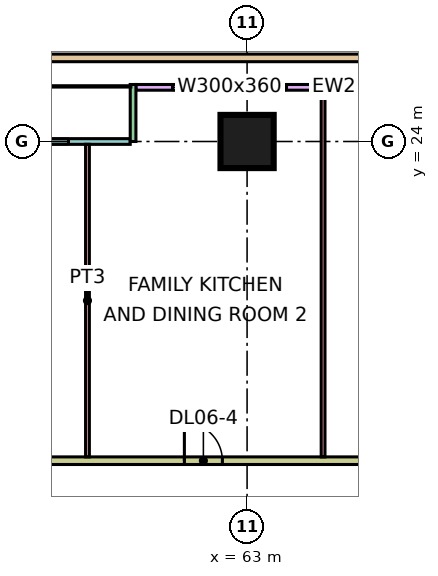
"""IFC4 building model, lengths in metres.
Left out: names, types, materials, properties, quantities, classifications, styles, units other than length and angle.
Written with IfcOpenShell. Run it as: python <this file> out.ifc"""

import sys

from ifc_helpers import new_model, si_unit, direction, frame, frame_2d, origin, origin_2d, place, context, subcontext, project, spatial, rectangle, extrude, element, fill, save


model = new_model("IFC4")
c1 = context("Model", 3, precision=1e-05, world=origin(), true_north=direction((0.0, 1.0)))
c2 = subcontext(c1, "Body", "Model", "MODEL_VIEW")
j1 = project(units=[si_unit("LENGTHUNIT", "METRE"), si_unit("PLANEANGLEUNIT", "RADIAN")], contexts=[c1])
p1 = place(None, origin())
s1 = spatial("IfcSite", under=j1, at=p1, CompositionType="ELEMENT")
p2 = place(p1, origin())
s2 = spatial("IfcBuilding", under=s1, at=p2, CompositionType="ELEMENT")
p3 = place(p2, frame((0.0, 0.0, 35.4)))
s3 = spatial("IfcBuildingStorey", under=s2, at=p3, CompositionType="ELEMENT", Elevation=35.4)
p4 = place(p3, frame((63.0, 24.0, 0.0), z_axis=(0.0, 0.0, 1.0), x_axis=(1.0, 0.0, 0.0)))
e1 = element("IfcColumn", 1, at=p4, inside=s3, PredefinedType="COLUMN", context=c2, shape_type="SweptSolid", body=[
    extrude(rectangle(XDim=1.4, YDim=1.4, at=origin_2d()), origin(), (0.0, 0.0, 1.0), 6.0),
])
p5 = place(p3, frame((70.5, 25.425, 0.0), z_axis=(0.0, 0.0, 1.0), x_axis=(-1.0, 0.0, 0.0)))
e2 = element("IfcWall", 2, at=p5, inside=s3, PredefinedType="SOLIDWALL", context=c2, shape_type="SweptSolid", body=[
    extrude(rectangle(XDim=10.425, YDim=0.15, at=frame_2d((5.212, 0.0))), origin(), (0.0, 0.0, 1.0), 5.6),
])
p6 = place(p5, frame((1.25, 0.0, 0.45)))
e3 = element("IfcOpeningElement", 3, at=p6, cuts=e2, PredefinedType="OPENING", context=c2, shape_type="SweptSolid", body=[
    extrude(rectangle(XDim=3.0, YDim=3.6, at=frame_2d((1.5, 1.8))), frame((0.0, 0.085, 0.0), z_axis=(0.0, -1.0, 0.0), x_axis=(1.0, 0.0, 0.0)), (0.0, 0.0, 1.0), 0.17),
])
p7 = place(p5, frame((6.462, 0.0, 0.45)))
e4 = element("IfcOpeningElement", 4, at=p7, cuts=e2, PredefinedType="OPENING", context=c2, shape_type="SweptSolid", body=[
    extrude(rectangle(XDim=3.0, YDim=3.6, at=frame_2d((1.5, 1.8))), frame((0.0, 0.085, 0.0), z_axis=(0.0, -1.0, 0.0), x_axis=(1.0, 0.0, 0.0)), (0.0, 0.0, 1.0), 0.17),
])
p8 = place(p3, frame((59.925, 24.0, 0.0), z_axis=(0.0, 0.0, 1.0), x_axis=(-1.0, 0.0, 0.0)))
e5 = element("IfcWall", 5, at=p8, inside=s3, PredefinedType="SOLIDWALL", context=c2, shape_type="SweptSolid", body=[
    extrude(rectangle(XDim=11.85, YDim=0.15, at=frame_2d((5.925, 0.0))), origin(), (0.0, 0.0, 1.0), 5.6),
])
p9 = place(p8, frame((1.625, 0.0, 0.45)))
e6 = element("IfcOpeningElement", 6, at=p9, cuts=e5, PredefinedType="OPENING", context=c2, shape_type="SweptSolid", body=[
    extrude(rectangle(XDim=3.0, YDim=3.6, at=frame_2d((1.5, 1.8))), frame((0.0, 0.085, 0.0), z_axis=(0.0, -1.0, 0.0), x_axis=(1.0, 0.0, 0.0)), (0.0, 0.0, 1.0), 0.17),
])
p10 = place(p8, frame((8.087, 0.0, 0.45)))
e7 = element("IfcOpeningElement", 7, at=p10, cuts=e5, PredefinedType="OPENING", context=c2, shape_type="SweptSolid", body=[
    extrude(rectangle(XDim=3.0, YDim=3.6, at=frame_2d((1.5, 1.8))), frame((0.0, 0.085, 0.0), z_axis=(0.0, -1.0, 0.0), x_axis=(1.0, 0.0, 0.0)), (0.0, 0.0, 1.0), 0.17),
])
p11 = place(p3, frame((60.0, 25.5, 0.0), z_axis=(0.0, 0.0, 1.0), x_axis=(0.0, -1.0, 0.0)))
e8 = element("IfcWall", 8, at=p11, inside=s3, PredefinedType="SOLIDWALL", context=c2, shape_type="SweptSolid", body=[
    extrude(rectangle(XDim=1.5, YDim=0.15, at=frame_2d((0.75, 0.0))), origin(), (0.0, 0.0, 1.0), 5.6),
])
p12 = place(p3, frame((40.79, 26.2, 0.0), z_axis=(0.0, 0.0, 1.0), x_axis=(1.0, 0.0, 0.0)))
e9 = element("IfcWall", 9, at=p12, inside=s3, PredefinedType="PARAPET", context=c2, shape_type="SweptSolid", body=[
    extrude(rectangle(XDim=30.0, YDim=0.2, at=frame_2d((15.0, 0.0))), origin(), (0.0, 0.0, 1.0), 0.5),
])
p13 = place(p3, frame((51.225, 15.6, 0.0), z_axis=(0.0, 0.0, 1.0), x_axis=(1.0, 0.0, 0.0)))
e10 = element("IfcWall", 10, at=p13, inside=s3, PredefinedType="PARTITIONING", context=c2, shape_type="SweptSolid", body=[
    extrude(rectangle(XDim=21.575, YDim=0.2, at=frame_2d((10.788, 0.0))), origin(), (0.0, 0.0, 1.0), 5.6),
])
p14 = place(p13, frame((0.225, 0.0, 0.0)))
e11 = element("IfcOpeningElement", 11, at=p14, cuts=e10, PredefinedType="OPENING", context=c2, shape_type="SweptSolid", body=[
    extrude(rectangle(XDim=1.0, YDim=2.1, at=frame_2d((0.5, 1.05))), frame((0.0, 0.11, 0.0), z_axis=(0.0, -1.0, 0.0), x_axis=(1.0, 0.0, 0.0)), (0.0, 0.0, 1.0), 0.22),
])
p15 = place(p13, frame((3.925, 0.0, 0.0)))
e12 = element("IfcOpeningElement", 12, at=p15, cuts=e10, PredefinedType="OPENING", context=c2, shape_type="SweptSolid", body=[
    extrude(rectangle(XDim=1.0, YDim=2.1, at=frame_2d((0.5, 1.05))), frame((0.0, 0.11, 0.0), z_axis=(0.0, -1.0, 0.0), x_axis=(1.0, 0.0, 0.0)), (0.0, 0.0, 1.0), 0.22),
])
p16 = place(p13, frame((10.125, 0.0, 0.0)))
e13 = element("IfcOpeningElement", 13, at=p16, cuts=e10, PredefinedType="OPENING", context=c2, shape_type="SweptSolid", body=[
    extrude(rectangle(XDim=1.0, YDim=2.1, at=frame_2d((0.5, 1.05))), frame((0.0, 0.11, 0.0), z_axis=(0.0, -1.0, 0.0), x_axis=(1.0, 0.0, 0.0)), (0.0, 0.0, 1.0), 0.22),
])
p17 = place(p13, frame((16.325, 0.0, 0.0)))
e14 = element("IfcOpeningElement", 14, at=p17, cuts=e10, PredefinedType="OPENING", context=c2, shape_type="SweptSolid", body=[
    extrude(rectangle(XDim=1.0, YDim=2.1, at=frame_2d((0.5, 1.05))), frame((0.0, 0.11, 0.0), z_axis=(0.0, -1.0, 0.0), x_axis=(1.0, 0.0, 0.0)), (0.0, 0.0, 1.0), 0.22),
])
p18 = place(p3, frame((58.8, 15.7, 0.0), z_axis=(0.0, 0.0, 1.0), x_axis=(0.0, 1.0, 0.0)))
e15 = element("IfcWall", 15, at=p18, inside=s3, PredefinedType="PARTITIONING", context=c2, shape_type="SweptSolid", body=[
    extrude(rectangle(XDim=8.226, YDim=0.1, at=frame_2d((4.113, 0.0))), origin(), (0.0, 0.0, 1.0), 5.6),
])
p19 = place(p3, frame((65.0, 15.7, 0.0), z_axis=(0.0, 0.0, 1.0), x_axis=(0.0, 1.0, 0.0)))
e16 = element("IfcWall", 16, at=p19, inside=s3, PredefinedType="PARTITIONING", context=c2, shape_type="SweptSolid", body=[
    extrude(rectangle(XDim=9.651, YDim=0.1, at=frame_2d((4.826, 0.0))), origin(), (0.0, 0.0, 1.0), 5.6),
])
p20 = place(p7, origin())
e17 = element("IfcWindow", 17, at=p20, inside=s3, PartitioningType="SINGLE_PANEL", PredefinedType="WINDOW", context=c2, shape_type="SweptSolid", body=[
    extrude(rectangle(XDim=3.0, YDim=3.6, at=frame_2d((1.5, 1.8))), frame((0.0, 0.03, 0.0), z_axis=(0.0, -1.0, 0.0), x_axis=(1.0, 0.0, 0.0)), (0.0, 0.0, 1.0), 0.06),
])
fill(e4, e17)
p21 = place(p9, origin())
e18 = element("IfcWindow", 18, at=p21, inside=s3, PartitioningType="SINGLE_PANEL", PredefinedType="WINDOW", context=c2, shape_type="SweptSolid", body=[
    extrude(rectangle(XDim=3.0, YDim=3.6, at=frame_2d((1.5, 1.8))), frame((0.0, 0.03, 0.0), z_axis=(0.0, -1.0, 0.0), x_axis=(1.0, 0.0, 0.0)), (0.0, 0.0, 1.0), 0.06),
])
fill(e6, e18)
p22 = place(p16, origin())
e19 = element("IfcDoor", 19, at=p22, inside=s3, OperationType="SINGLE_SWING_LEFT", PredefinedType="DOOR", context=c2, shape_type="SweptSolid", body=[
    extrude(rectangle(XDim=1.0, YDim=2.1, at=frame_2d((0.5, 1.05))), frame((0.0, 0.025, 0.0), z_axis=(0.0, -1.0, 0.0), x_axis=(1.0, 0.0, 0.0)), (0.0, 0.0, 1.0), 0.05),
])
fill(e13, e19)
save(model, sys.argv[1])
